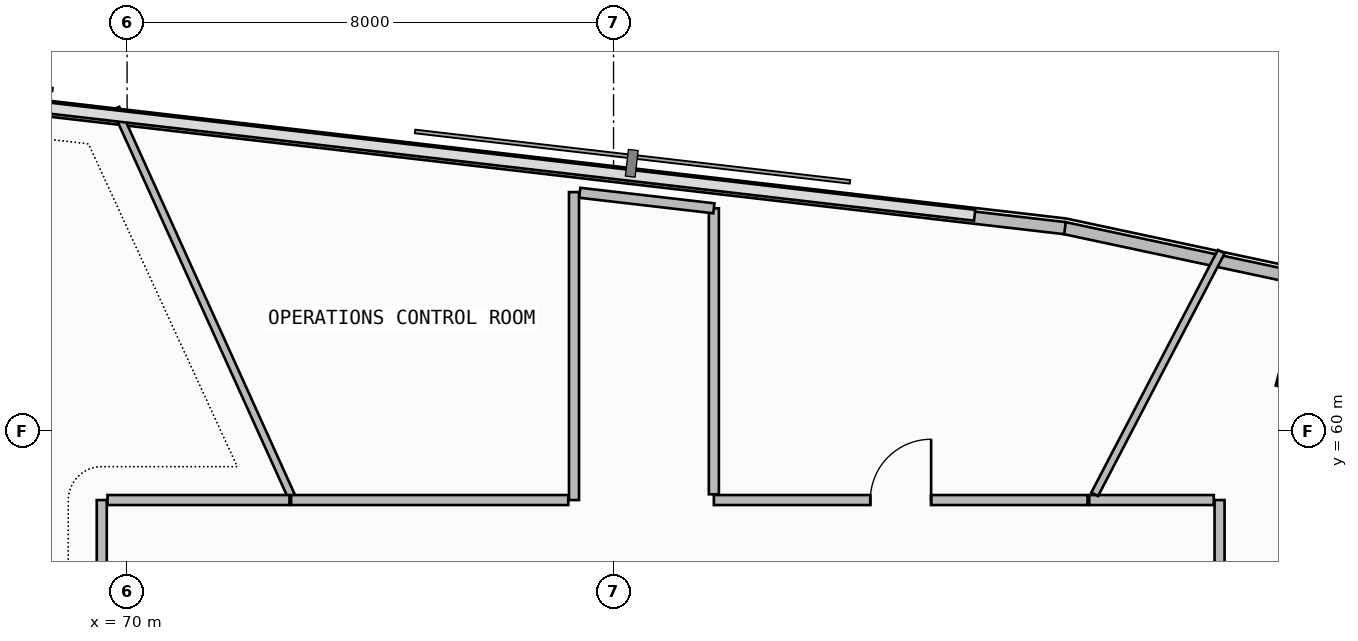
"""IFC4 building model, lengths in metres.
Left out: names, types, materials, properties, quantities, classifications, styles, units other than length and angle.
Written with IfcOpenShell. Run it as: python <this file> out.ifc"""

import sys

from ifc_helpers import new_model, si_unit, direction, frame, frame_2d, origin, origin_2d, place, context, subcontext, project, spatial, rectangle, extrude, element, fill, save


model = new_model("IFC4")
c1 = context("Model", 3, precision=1e-05, world=origin(), true_north=direction((0.0, 1.0)))
c2 = subcontext(c1, "Body", "Model", "MODEL_VIEW")
j1 = project(units=[si_unit("LENGTHUNIT", "METRE"), si_unit("PLANEANGLEUNIT", "RADIAN")], contexts=[c1])
p1 = place(None, origin())
s1 = spatial("IfcSite", under=j1, at=p1, CompositionType="ELEMENT")
p2 = place(p1, origin())
s2 = spatial("IfcBuilding", under=s1, at=p2, CompositionType="ELEMENT")
p3 = place(p2, frame((0.0, 0.0, 225.54)))
s3 = spatial("IfcBuildingStorey", under=s2, at=p3, CompositionType="ELEMENT", Elevation=225.54)
p4 = place(p3, frame((89.562, 61.135, 0.0), z_axis=(0.0, 0.0, 1.0), x_axis=(0.263031214458, 0.964787323829, 0.0)))
e1 = element("IfcColumn", 1, at=p4, inside=s3, PredefinedType="COLUMN", context=c2, shape_type="SweptSolid", body=[
    extrude(rectangle(XDim=1.05, YDim=1.05, at=origin_2d()), origin(), (0.0, 0.0, 1.0), 3.52),
])
p5 = place(p3, frame((116.396, 56.722, 0.0), z_axis=(0.0, 0.0, 1.0), x_axis=(-0.977936620644, 0.208901809478, 0.0)))
e2 = element("IfcWall", 2, at=p5, inside=s3, PredefinedType="PARAPET", context=c2, shape_type="SweptSolid", body=[
    extrude(rectangle(XDim=31.685, YDim=0.2, at=frame_2d((15.843, 0.0))), origin(), (0.0, 0.0, 1.0), 1.15),
])
p6 = place(p3, frame((85.424, 63.338, 0.0), z_axis=(0.0, 0.0, 1.0), x_axis=(-0.993364714048, 0.115006716693, 0.0)))
e3 = element("IfcWall", 3, at=p6, inside=s3, PredefinedType="PARAPET", context=c2, shape_type="SweptSolid", body=[
    extrude(rectangle(XDim=26.302, YDim=0.2, at=frame_2d((13.151, 0.0))), origin(), (0.0, 0.0, 1.0), 1.15),
])
p7 = place(p3, frame((88.045, 49.493, 0.0), z_axis=(0.0, 0.0, 1.0), x_axis=(0.918480929911, 0.395465272041, 0.0)))
e4 = element("IfcWall", 4, at=p7, inside=s3, PredefinedType="PARTITIONING", context=c2, shape_type="SweptSolid", body=[
    extrude(rectangle(XDim=22.729, YDim=0.125, at=frame_2d((11.365, 0.0))), origin(), (0.0, 0.0, 1.0), 2.645),
])
p8 = place(p3, frame((87.967, 51.392, 0.0), z_axis=(0.0, 0.0, 1.0), x_axis=(0.843496225595, 0.537135101634, 0.0)))
e5 = element("IfcWall", 5, at=p8, inside=s3, PredefinedType="PARTITIONING", context=c2, shape_type="SweptSolid", body=[
    extrude(rectangle(XDim=16.124, YDim=0.125, at=frame_2d((8.062, 0.0))), origin(), (0.0, 0.0, 1.0), 2.645),
])
p9 = place(p3, frame((87.967, 51.48, 0.0), z_axis=(0.0, 0.0, 1.0), x_axis=(0.0, 1.0, 0.0)))
e6 = element("IfcWall", 6, at=p9, inside=s3, PredefinedType="PARTITIONING", context=c2, shape_type="SweptSolid", body=[
    extrude(rectangle(XDim=7.386, YDim=0.165, at=frame_2d((3.693, 0.0))), origin(), (0.0, 0.0, 1.0), 2.745),
])
p10 = place(p9, frame((2.295, 0.0, 0.0)))
e7 = element("IfcOpeningElement", 7, at=p10, cuts=e6, PredefinedType="OPENING", context=c2, shape_type="SweptSolid", body=[
    extrude(rectangle(XDim=1.0, YDim=2.2, at=frame_2d((0.5, 1.1))), frame((0.0, 0.093, 0.0), z_axis=(0.0, -1.0, 0.0), x_axis=(1.0, 0.0, 0.0)), (0.0, 0.0, 1.0), 0.185),
])
p11 = place(p3, frame((87.872, 58.867, 0.0), z_axis=(0.0, 0.0, 1.0), x_axis=(-1.0, 0.0, 0.0)))
e8 = element("IfcWall", 8, at=p11, inside=s3, PredefinedType="PARTITIONING", context=c2, shape_type="SweptSolid", body=[
    extrude(rectangle(XDim=2.049, YDim=0.165, at=frame_2d((1.024, 0.0))), origin(), (0.0, 0.0, 1.0), 2.745),
])
p12 = place(p3, frame((85.913, 58.961, 0.0), z_axis=(0.0, 0.0, 1.0), x_axis=(0.462551177511, 0.886592582973, 0.0)))
e9 = element("IfcWall", 9, at=p12, inside=s3, PredefinedType="PARTITIONING", context=c2, shape_type="SweptSolid", body=[
    extrude(rectangle(XDim=4.501, YDim=0.125, at=frame_2d((2.25, 0.0))), origin(), (0.0, 0.0, 1.0), 3.26),
])
p13 = place(p3, frame((85.796, 58.867, 0.0), z_axis=(0.0, 0.0, 1.0), x_axis=(-1.0, 0.0, 0.0)))
e10 = element("IfcWall", 10, at=p13, inside=s3, PredefinedType="PARTITIONING", context=c2, shape_type="SweptSolid", body=[
    extrude(rectangle(XDim=6.146, YDim=0.165, at=frame_2d((3.073, 0.0))), origin(), (0.0, 0.0, 1.0), 3.26),
])
p14 = place(p13, frame((2.573, 0.0, 0.0)))
e11 = element("IfcOpeningElement", 11, at=p14, cuts=e10, PredefinedType="OPENING", context=c2, shape_type="SweptSolid", body=[
    extrude(rectangle(XDim=1.0, YDim=2.2, at=frame_2d((0.5, 1.1))), frame((0.0, 0.093, 0.0), z_axis=(0.0, -1.0, 0.0), x_axis=(1.0, 0.0, 0.0)), (0.0, 0.0, 1.0), 0.185),
])
p15 = place(p3, frame((77.35, 63.931, 0.0), z_axis=(0.0, 0.0, 1.0), x_axis=(0.0, -1.0, 0.0)))
e12 = element("IfcWall", 12, at=p15, inside=s3, PredefinedType="PARTITIONING", context=c2, shape_type="SweptSolid", body=[
    extrude(rectangle(XDim=5.064, YDim=0.165, at=frame_2d((2.532, 0.0))), origin(), (0.0, 0.0, 1.0), 3.26),
])
p16 = place(p3, frame((79.65, 58.961, 0.0), z_axis=(0.0, 0.0, 1.0), x_axis=(0.0, 1.0, 0.0)))
e13 = element("IfcWall", 13, at=p16, inside=s3, PredefinedType="PARTITIONING", context=c2, shape_type="SweptSolid", body=[
    extrude(rectangle(XDim=4.703, YDim=0.165, at=frame_2d((2.352, 0.0))), origin(), (0.0, 0.0, 1.0), 3.26),
])
p17 = place(p3, frame((77.256, 58.867, 0.0), z_axis=(0.0, 0.0, 1.0), x_axis=(-1.0, 0.0, 0.0)))
e14 = element("IfcWall", 14, at=p17, inside=s3, PredefinedType="PARTITIONING", context=c2, shape_type="SweptSolid", body=[
    extrude(rectangle(XDim=4.559, YDim=0.165, at=frame_2d((2.279, 0.0))), origin(), (0.0, 0.0, 1.0), 3.26),
])
p18 = place(p3, frame((79.65, 63.665, 0.0), z_axis=(0.0, 0.0, 1.0), x_axis=(-0.993362136032, 0.115028981987, 0.0)))
e15 = element("IfcWall", 15, at=p18, inside=s3, PredefinedType="PARTITIONING", context=c2, shape_type="SweptSolid", body=[
    extrude(rectangle(XDim=2.22, YDim=0.165, at=frame_2d((1.11, 0.0))), origin(), (0.0, 0.0, 1.0), 3.26),
])
p19 = place(p3, frame((72.697, 58.941, 0.0), z_axis=(0.0, 0.0, 1.0), x_axis=(-0.412591789652, 0.910916030769, 0.0)))
e16 = element("IfcWall", 16, at=p19, inside=s3, PredefinedType="PARTITIONING", context=c2, shape_type="SweptSolid", body=[
    extrude(rectangle(XDim=6.988, YDim=0.125, at=frame_2d((3.494, 0.0))), origin(), (0.0, 0.0, 1.0), 3.26),
])
p20 = place(p3, frame((69.583, 58.867, 0.0), z_axis=(0.0, 0.0, 1.0), x_axis=(0.0, -1.0, 0.0)))
e17 = element("IfcWall", 17, at=p20, inside=s3, PredefinedType="PARTITIONING", context=c2, shape_type="SweptSolid", body=[
    extrude(rectangle(XDim=11.186, YDim=0.165, at=frame_2d((5.593, 0.0))), origin(), (0.0, 0.0, 1.0), 2.745),
])
p21 = place(p20, frame((7.833, 0.0, 0.0)))
e18 = element("IfcOpeningElement", 18, at=p21, cuts=e17, PredefinedType="OPENING", context=c2, shape_type="SweptSolid", body=[
    extrude(rectangle(XDim=1.0, YDim=2.2, at=frame_2d((0.5, 1.1))), frame((0.0, 0.093, 0.0), z_axis=(0.0, -1.0, 0.0), x_axis=(1.0, 0.0, 0.0)), (0.0, 0.0, 1.0), 0.185),
])
p22 = place(p3, frame((72.671, 58.867, 0.0), z_axis=(0.0, 0.0, 1.0), x_axis=(-1.0, 0.0, 0.0)))
e19 = element("IfcWall", 19, at=p22, inside=s3, PredefinedType="PARTITIONING", context=c2, shape_type="SweptSolid", body=[
    extrude(rectangle(XDim=2.993, YDim=0.165, at=frame_2d((1.497, 0.0))), origin(), (0.0, 0.0, 1.0), 3.26),
])
p23 = place(p14, frame((1.0, 0.0, 0.0), z_axis=(0.0, 0.0, 1.0), x_axis=(-1.0, 0.0, 0.0)))
e20 = element("IfcDoor", 20, at=p23, inside=s3, OperationType="SINGLE_SWING_RIGHT", PredefinedType="DOOR", context=c2, shape_type="SweptSolid", body=[
    extrude(rectangle(XDim=1.0, YDim=2.2, at=frame_2d((0.5, 1.1))), frame((0.0, 0.025, 0.0), z_axis=(0.0, -1.0, 0.0), x_axis=(1.0, 0.0, 0.0)), (0.0, 0.0, 1.0), 0.05),
])
fill(e11, e20)
save(model, sys.argv[1])
